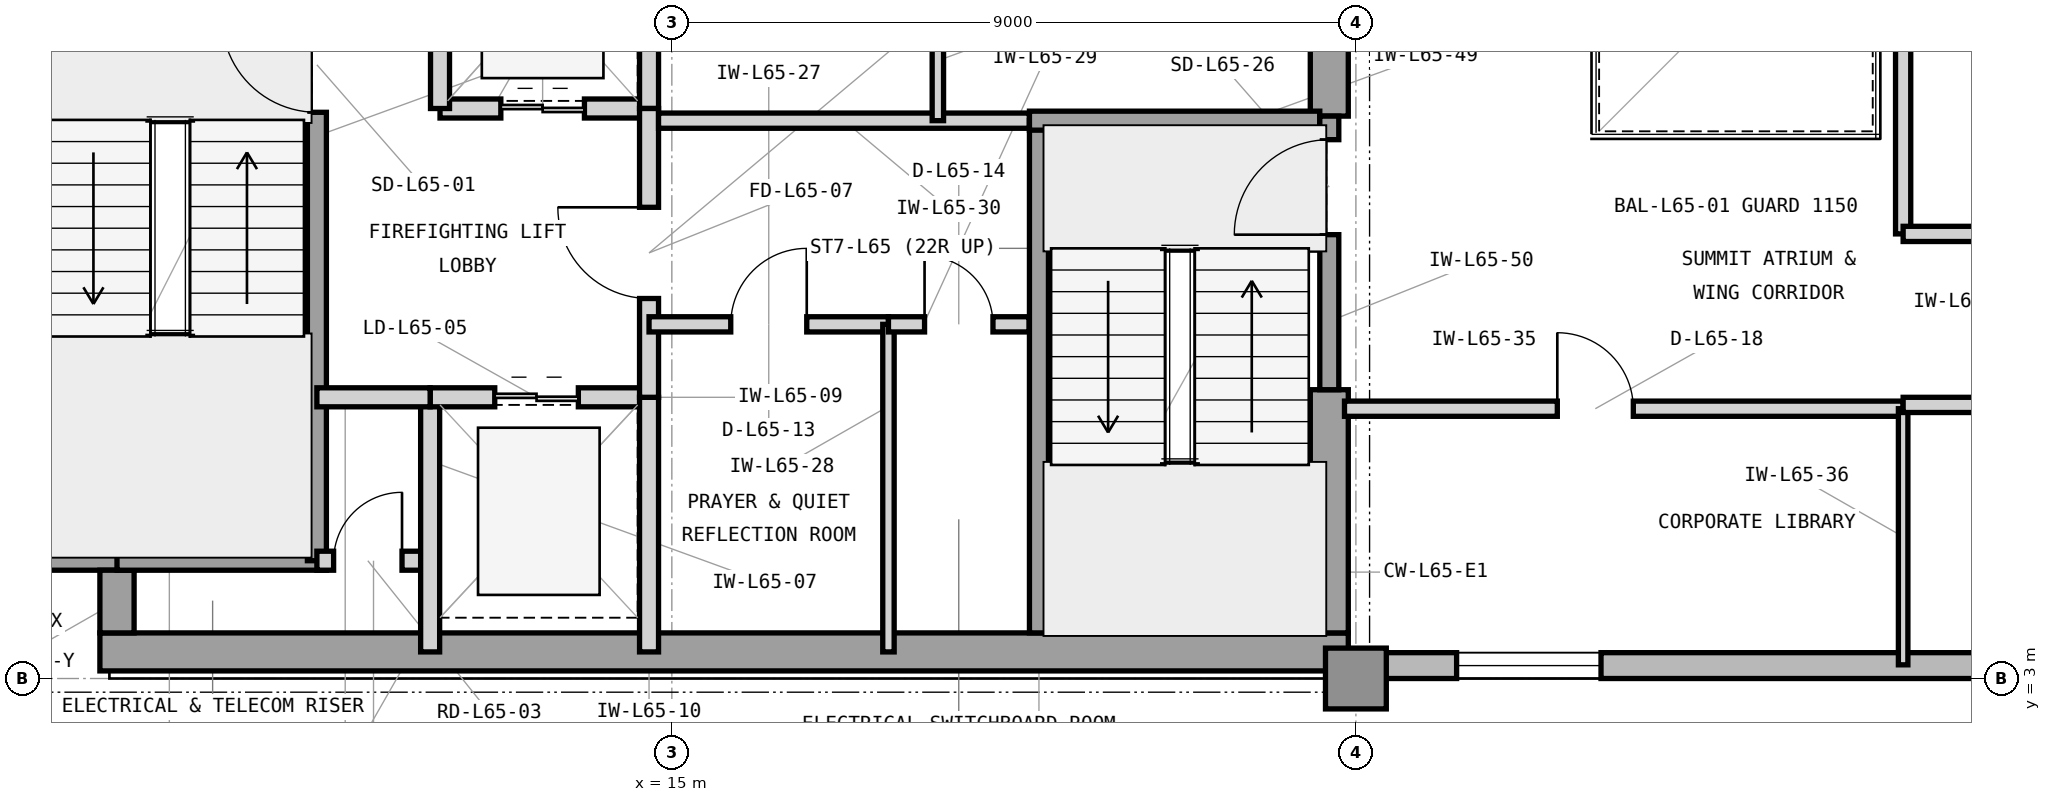
"""IFC4 building model, lengths in metres.
Left out: names, types, materials, properties, quantities, classifications, styles, units other than length and angle.
Written with IfcOpenShell. Run it as: python <this file> out.ifc"""

import sys

from ifc_helpers import new_model, si_unit, direction, frame, frame_2d, origin, origin_2d, place, context, subcontext, project, spatial, rectangle, extrude, element, fill, save


model = new_model("IFC4")
c1 = context("Model", 3, precision=1e-05, world=origin(), true_north=direction((0.0, 1.0)))
c2 = subcontext(c1, "Body", "Model", "MODEL_VIEW")
j1 = project(units=[si_unit("LENGTHUNIT", "METRE"), si_unit("PLANEANGLEUNIT", "RADIAN")], contexts=[c1])
p1 = place(None, origin())
s1 = spatial("IfcSite", under=j1, at=p1, CompositionType="ELEMENT")
p2 = place(p1, origin())
s2 = spatial("IfcBuilding", under=s1, at=p2, CompositionType="ELEMENT")
p3 = place(p2, frame((0.0, 0.0, 266.4)))
s3 = spatial("IfcBuildingStorey", under=s2, at=p3, CompositionType="ELEMENT", Elevation=266.4)
p4 = place(p3, frame((7.475, 3.35, 0.0), z_axis=(0.0, 0.0, 1.0), x_axis=(1.0, 0.0, 0.0)))
e1 = element("IfcWall", 1, at=p4, inside=s3, PredefinedType="SHEAR", context=c2, shape_type="SweptSolid", body=[
    extrude(rectangle(XDim=16.425, YDim=0.5, at=frame_2d((8.212, 0.0))), origin(), (0.0, 0.0, 1.0), 3.9),
])
p5 = place(p3, frame((23.65, 3.6, 0.0), z_axis=(0.0, 0.0, 1.0), x_axis=(0.0, 1.0, 0.0)))
e2 = element("IfcWall", 2, at=p5, inside=s3, PredefinedType="SHEAR", context=c2, shape_type="SweptSolid", body=[
    extrude(rectangle(XDim=3.2, YDim=0.5, at=frame_2d((1.6, 0.0))), origin(), (0.0, 0.0, 1.0), 3.9),
])
p6 = place(p3, frame((23.65, 10.4, 0.0), z_axis=(0.0, 0.0, 1.0), x_axis=(0.0, 1.0, 0.0)))
e3 = element("IfcWall", 3, at=p6, inside=s3, PredefinedType="SHEAR", context=c2, shape_type="SweptSolid", body=[
    extrude(rectangle(XDim=3.2, YDim=0.5, at=frame_2d((1.6, 0.0))), origin(), (0.0, 0.0, 1.0), 3.9),
])
p7 = place(p3, frame((6.6, 4.65, 0.0), z_axis=(0.0, 0.0, 1.0), x_axis=(1.0, 0.0, 0.0)))
e4 = element("IfcWall", 4, at=p7, inside=s3, PredefinedType="SHEAR", context=c2, shape_type="SweptSolid", body=[
    extrude(rectangle(XDim=1.325, YDim=0.45, at=frame_2d((0.663, 0.0))), origin(), (0.0, 0.0, 1.0), 3.9),
])
p8 = place(p3, frame((7.7, 3.6, 0.0), z_axis=(0.0, 0.0, 1.0), x_axis=(0.0, 1.0, 0.0)))
e5 = element("IfcWall", 5, at=p8, inside=s3, PredefinedType="SHEAR", context=c2, shape_type="SweptSolid", body=[
    extrude(rectangle(XDim=0.825, YDim=0.45, at=frame_2d((0.413, 0.0))), origin(), (0.0, 0.0, 1.0), 3.9),
])
p9 = place(p3, frame((24.0, 3.0, 0.0), z_axis=(0.0, 0.0, 1.0), x_axis=(1.0, 0.0, 0.0)))
e6 = element("IfcColumn", 6, at=p9, inside=s3, PredefinedType="COLUMN", context=c2, shape_type="SweptSolid", body=[
    extrude(rectangle(XDim=0.8, YDim=0.8, at=origin_2d()), origin(), (0.0, 0.0, 1.0), 3.9),
])
p10 = place(p3, frame((23.9, 3.17, 0.0), z_axis=(0.0, 0.0, 1.0), x_axis=(1.0, 0.0, 0.0)))
e7 = element("IfcWall", 7, at=p10, inside=s3, PredefinedType="STANDARD", context=c2, shape_type="SweptSolid", body=[
    extrude(rectangle(XDim=28.5, YDim=0.34, at=frame_2d((14.25, 0.0))), origin(), (0.0, 0.0, 1.0), 3.715),
])
p11 = place(p10, frame((1.425, 0.0, 0.8)))
e8 = element("IfcOpeningElement", 8, at=p11, cuts=e7, PredefinedType="OPENING", context=c2, shape_type="SweptSolid", body=[
    extrude(rectangle(XDim=1.9, YDim=2.35, at=frame_2d((0.95, 1.175))), frame((0.0, 0.18, 0.0), z_axis=(0.0, -1.0, 0.0), x_axis=(1.0, 0.0, 0.0)), (0.0, 0.0, 1.0), 0.36),
])
p12 = place(p10, frame((10.575, 0.0, 0.8)))
e9 = element("IfcOpeningElement", 9, at=p12, cuts=e7, PredefinedType="OPENING", context=c2, shape_type="SweptSolid", body=[
    extrude(rectangle(XDim=2.6, YDim=2.35, at=frame_2d((1.3, 1.175))), frame((0.0, 0.18, 0.0), z_axis=(0.0, -1.0, 0.0), x_axis=(1.0, 0.0, 0.0)), (0.0, 0.0, 1.0), 0.36),
])
p13 = place(p10, frame((20.075, 0.0, 0.8)))
e10 = element("IfcOpeningElement", 10, at=p13, cuts=e7, PredefinedType="OPENING", context=c2, shape_type="SweptSolid", body=[
    extrude(rectangle(XDim=2.6, YDim=2.35, at=frame_2d((1.3, 1.175))), frame((0.0, 0.18, 0.0), z_axis=(0.0, -1.0, 0.0), x_axis=(1.0, 0.0, 0.0)), (0.0, 0.0, 1.0), 0.36),
])
p14 = place(p3, frame((7.7, 4.55, 0.0), z_axis=(0.0, 0.0, 1.0), x_axis=(1.0, 0.0, 0.0)))
e11 = element("IfcWall", 11, at=p14, inside=s3, PredefinedType="SHEAR", context=c2, shape_type="SweptSolid", body=[
    extrude(rectangle(XDim=2.755, YDim=0.25, at=frame_2d((1.377, 0.0))), origin(), (0.0, 0.0, 1.0), 3.9),
])
p15 = place(p3, frame((10.33, 4.55, 0.0), z_axis=(0.0, 0.0, 1.0), x_axis=(0.0, 1.0, 0.0)))
e12 = element("IfcWall", 12, at=p15, inside=s3, PredefinedType="SHEAR", context=c2, shape_type="SweptSolid", body=[
    extrude(rectangle(XDim=7.45, YDim=0.25, at=frame_2d((3.725, 0.0))), origin(), (0.0, 0.0, 1.0), 3.9),
])
p16 = place(p15, frame((5.9, 0.0, 0.0)))
e13 = element("IfcOpeningElement", 13, at=p16, cuts=e12, PredefinedType="OPENING", context=c2, shape_type="SweptSolid", body=[
    extrude(rectangle(XDim=1.25, YDim=2.2, at=frame_2d((0.625, 1.1))), frame((0.0, 0.135, 0.0), z_axis=(0.0, -1.0, 0.0), x_axis=(1.0, 0.0, 0.0)), (0.0, 0.0, 1.0), 0.27),
])
p17 = place(p3, frame((10.33, 4.55, 0.0), z_axis=(0.0, 0.0, 1.0), x_axis=(1.0, 0.0, 0.0)))
e14 = element("IfcWall", 14, at=p17, inside=s3, PredefinedType="PARTITIONING", context=c2, shape_type="SweptSolid", body=[
    extrude(rectangle(XDim=1.49, YDim=0.25, at=frame_2d((0.745, 0.0))), origin(), (0.0, 0.0, 1.0), 3.705),
])
p18 = place(p17, frame((0.22, 0.0, 0.0)))
e15 = element("IfcOpeningElement", 15, at=p18, cuts=e14, PredefinedType="OPENING", context=c2, shape_type="SweptSolid", body=[
    extrude(rectangle(XDim=0.9, YDim=2.1, at=frame_2d((0.45, 1.05))), frame((0.0, 0.135, 0.0), z_axis=(0.0, -1.0, 0.0), x_axis=(1.0, 0.0, 0.0)), (0.0, 0.0, 1.0), 0.27),
])
p19 = place(p3, frame((11.82, 3.35, 0.0), z_axis=(0.0, 0.0, 1.0), x_axis=(0.0, 1.0, 0.0)))
e16 = element("IfcWall", 16, at=p19, inside=s3, PredefinedType="PARTITIONING", context=c2, shape_type="SweptSolid", body=[
    extrude(rectangle(XDim=3.35, YDim=0.25, at=frame_2d((1.675, 0.0))), origin(), (0.0, 0.0, 1.0), 3.705),
])
p20 = place(p3, frame((11.82, 6.7, 0.0), z_axis=(0.0, 0.0, 1.0), x_axis=(1.0, 0.0, 0.0)))
e17 = element("IfcWall", 17, at=p20, inside=s3, PredefinedType="PARTITIONING", context=c2, shape_type="SweptSolid", body=[
    extrude(rectangle(XDim=2.88, YDim=0.25, at=frame_2d((1.44, 0.0))), origin(), (0.0, 0.0, 1.0), 3.088),
])
p21 = place(p20, frame((0.85, 0.0, 0.0)))
e18 = element("IfcOpeningElement", 18, at=p21, cuts=e17, PredefinedType="OPENING", context=c2, shape_type="SweptSolid", body=[
    extrude(rectangle(XDim=1.1, YDim=2.25, at=frame_2d((0.55, 1.125))), frame((0.0, 0.135, 0.0), z_axis=(0.0, -1.0, 0.0), x_axis=(1.0, 0.0, 0.0)), (0.0, 0.0, 1.0), 0.27),
])
p22 = place(p3, frame((14.7, 3.35, 0.0), z_axis=(0.0, 0.0, 1.0), x_axis=(0.0, 1.0, 0.0)))
e19 = element("IfcWall", 19, at=p22, inside=s3, PredefinedType="PARTITIONING", context=c2, shape_type="SweptSolid", body=[
    extrude(rectangle(XDim=3.35, YDim=0.25, at=frame_2d((1.675, 0.0))), origin(), (0.0, 0.0, 1.0), 3.705),
])
p23 = place(p3, frame((11.95, 10.5, 0.0), z_axis=(0.0, 0.0, 1.0), x_axis=(1.0, 0.0, 0.0)))
e20 = element("IfcWall", 20, at=p23, inside=s3, PredefinedType="PARTITIONING", context=c2, shape_type="SweptSolid", body=[
    extrude(rectangle(XDim=2.75, YDim=0.25, at=frame_2d((1.375, 0.0))), origin(), (0.0, 0.0, 1.0), 3.088),
])
p24 = place(p23, frame((0.8, 0.0, 0.0)))
e21 = element("IfcOpeningElement", 21, at=p24, cuts=e20, PredefinedType="OPENING", context=c2, shape_type="SweptSolid", body=[
    extrude(rectangle(XDim=1.1, YDim=2.25, at=frame_2d((0.55, 1.125))), frame((0.0, 0.135, 0.0), z_axis=(0.0, -1.0, 0.0), x_axis=(1.0, 0.0, 0.0)), (0.0, 0.0, 1.0), 0.27),
])
for number, where, z_axis, x_axis in (
    (22, (11.95, 10.5, 0.0), (0.0, 0.0, 1.0), (0.0, 1.0, 0.0)),
    (23, (14.7, 10.5, 0.0), (0.0, 0.0, 1.0), (0.0, 1.0, 0.0)),
):
    element("IfcWall", number, at=place(p3, frame(where, z_axis=z_axis, x_axis=x_axis)), inside=s3, PredefinedType="PARTITIONING", context=c2, shape_type="SweptSolid", body=[
        extrude(rectangle(XDim=3.0, YDim=0.25, at=frame_2d((1.5, 0.0))), origin(), (0.0, 0.0, 1.0), 3.705),
    ])
p25 = place(p3, frame((14.7, 6.7, 0.0), z_axis=(0.0, 0.0, 1.0), x_axis=(0.0, 1.0, 0.0)))
e24 = element("IfcWall", 24, at=p25, inside=s3, PredefinedType="PARTITIONING", context=c2, shape_type="SweptSolid", body=[
    extrude(rectangle(XDim=3.8, YDim=0.25, at=frame_2d((1.9, 0.0))), origin(), (0.0, 0.0, 1.0), 3.705),
])
p26 = place(p25, frame((1.3, 0.0, 0.0)))
e25 = element("IfcOpeningElement", 25, at=p26, cuts=e24, PredefinedType="OPENING", context=c2, shape_type="SweptSolid", body=[
    extrude(rectangle(XDim=1.2, YDim=2.2, at=frame_2d((0.6, 1.1))), frame((0.0, 0.135, 0.0), z_axis=(0.0, -1.0, 0.0), x_axis=(1.0, 0.0, 0.0)), (0.0, 0.0, 1.0), 0.27),
])
p27 = place(p3, frame((10.33, 6.7, 0.0), z_axis=(0.0, 0.0, 1.0), x_axis=(1.0, 0.0, 0.0)))
e26 = element("IfcWall", 26, at=p27, inside=s3, PredefinedType="PARTITIONING", context=c2, shape_type="SweptSolid", body=[
    extrude(rectangle(XDim=1.49, YDim=0.25, at=frame_2d((0.745, 0.0))), origin(), (0.0, 0.0, 1.0), 3.088),
])
p28 = place(p3, frame((14.7, 7.66, 0.0), z_axis=(0.0, 0.0, 1.0), x_axis=(1.0, 0.0, 0.0)))
e27 = element("IfcWall", 27, at=p28, inside=s3, PredefinedType="PARTITIONING", context=c2, shape_type="SweptSolid", body=[
    extrude(rectangle(XDim=3.15, YDim=0.2, at=frame_2d((1.575, 0.0))), origin(), (0.0, 0.0, 1.0), 3.705),
])
p29 = place(p28, frame((1.075, 0.0, 0.0)))
e28 = element("IfcOpeningElement", 28, at=p29, cuts=e27, PredefinedType="OPENING", context=c2, shape_type="SweptSolid", body=[
    extrude(rectangle(XDim=1.0, YDim=2.15, at=frame_2d((0.5, 1.075))), frame((0.0, 0.11, 0.0), z_axis=(0.0, -1.0, 0.0), x_axis=(1.0, 0.0, 0.0)), (0.0, 0.0, 1.0), 0.22),
])
p30 = place(p3, frame((17.85, 3.35, 0.0), z_axis=(0.0, 0.0, 1.0), x_axis=(0.0, 1.0, 0.0)))
e29 = element("IfcWall", 29, at=p30, inside=s3, PredefinedType="PARTITIONING", context=c2, shape_type="SweptSolid", body=[
    extrude(rectangle(XDim=4.31, YDim=0.15, at=frame_2d((2.155, 0.0))), origin(), (0.0, 0.0, 1.0), 3.705),
])
p31 = place(p3, frame((17.85, 7.66, 0.0), z_axis=(0.0, 0.0, 1.0), x_axis=(1.0, 0.0, 0.0)))
e30 = element("IfcWall", 30, at=p31, inside=s3, PredefinedType="PARTITIONING", context=c2, shape_type="SweptSolid", body=[
    extrude(rectangle(XDim=1.85, YDim=0.2, at=frame_2d((0.925, 0.0))), origin(), (0.0, 0.0, 1.0), 3.705),
])
p32 = place(p31, frame((0.475, 0.0, 0.0)))
e31 = element("IfcOpeningElement", 31, at=p32, cuts=e30, PredefinedType="OPENING", context=c2, shape_type="SweptSolid", body=[
    extrude(rectangle(XDim=0.9, YDim=2.1, at=frame_2d((0.45, 1.05))), frame((0.0, 0.11, 0.0), z_axis=(0.0, -1.0, 0.0), x_axis=(1.0, 0.0, 0.0)), (0.0, 0.0, 1.0), 0.22),
])
p33 = place(p3, frame((14.825, 10.34, 0.0), z_axis=(0.0, 0.0, 1.0), x_axis=(1.0, 0.0, 0.0)))
e32 = element("IfcWall", 32, at=p33, inside=s3, PredefinedType="PARTITIONING", context=c2, shape_type="SweptSolid", body=[
    extrude(rectangle(XDim=4.88, YDim=0.2, at=frame_2d((2.44, 0.0))), origin(), (0.0, 0.0, 1.0), 3.088),
])
p34 = place(p3, frame((18.5, 10.34, 0.0), z_axis=(0.0, 0.0, 1.0), x_axis=(0.0, 1.0, 0.0)))
e33 = element("IfcWall", 33, at=p34, inside=s3, PredefinedType="PARTITIONING", context=c2, shape_type="SweptSolid", body=[
    extrude(rectangle(XDim=3.16, YDim=0.15, at=frame_2d((1.58, 0.0))), origin(), (0.0, 0.0, 1.0), 3.705),
])
p35 = place(p3, frame((23.85, 6.55, 0.0), z_axis=(0.0, 0.0, 1.0), x_axis=(1.0, 0.0, 0.0)))
e34 = element("IfcWall", 34, at=p35, inside=s3, PredefinedType="PARTITIONING", context=c2, shape_type="SweptSolid", body=[
    extrude(rectangle(XDim=7.35, YDim=0.2, at=frame_2d((3.675, 0.0))), origin(), (0.0, 0.0, 1.0), 3.705),
])
p36 = place(p35, frame((2.8, 0.0, 0.0)))
e35 = element("IfcOpeningElement", 35, at=p36, cuts=e34, PredefinedType="OPENING", context=c2, shape_type="SweptSolid", body=[
    extrude(rectangle(XDim=1.0, YDim=2.15, at=frame_2d((0.5, 1.075))), frame((0.0, 0.11, 0.0), z_axis=(0.0, -1.0, 0.0), x_axis=(1.0, 0.0, 0.0)), (0.0, 0.0, 1.0), 0.22),
])
p37 = place(p3, frame((31.2, 3.18, 0.0), z_axis=(0.0, 0.0, 1.0), x_axis=(0.0, 1.0, 0.0)))
e36 = element("IfcWall", 36, at=p37, inside=s3, PredefinedType="PARTITIONING", context=c2, shape_type="SweptSolid", body=[
    extrude(rectangle(XDim=3.37, YDim=0.125, at=frame_2d((1.685, 0.0))), origin(), (0.0, 0.0, 1.0), 3.705),
])
p38 = place(p3, frame((31.2, 8.85, 0.0), z_axis=(0.0, 0.0, 1.0), x_axis=(0.0, 1.0, 0.0)))
e37 = element("IfcWall", 37, at=p38, inside=s3, PredefinedType="PARTITIONING", context=c2, shape_type="SweptSolid", body=[
    extrude(rectangle(XDim=11.97, YDim=0.2, at=frame_2d((5.985, 0.0))), origin(), (0.0, 0.0, 1.0), 3.705),
])
p39 = place(p3, frame((31.2, 6.6, 0.0), z_axis=(0.0, 0.0, 1.0), x_axis=(1.0, 0.0, 0.0)))
e38 = element("IfcWall", 38, at=p39, inside=s3, PredefinedType="PARTITIONING", context=c2, shape_type="SweptSolid", body=[
    extrude(rectangle(XDim=9.5, YDim=0.2, at=frame_2d((4.75, 0.0))), origin(), (0.0, 0.0, 1.0), 3.705),
])
p40 = place(p39, frame((4.25, 0.0, 0.0)))
e39 = element("IfcOpeningElement", 39, at=p40, cuts=e38, PredefinedType="OPENING", context=c2, shape_type="SweptSolid", body=[
    extrude(rectangle(XDim=1.0, YDim=2.15, at=frame_2d((0.5, 1.075))), frame((0.0, 0.11, 0.0), z_axis=(0.0, -1.0, 0.0), x_axis=(1.0, 0.0, 0.0)), (0.0, 0.0, 1.0), 0.22),
])
p41 = place(p3, frame((31.2, 8.85, 0.0), z_axis=(0.0, 0.0, 1.0), x_axis=(1.0, 0.0, 0.0)))
e40 = element("IfcWall", 40, at=p41, inside=s3, PredefinedType="PARTITIONING", context=c2, shape_type="SweptSolid", body=[
    extrude(rectangle(XDim=6.5, YDim=0.2, at=frame_2d((3.25, 0.0))), origin(), (0.0, 0.0, 1.0), 3.705),
])
p42 = place(p41, frame((2.5, 0.0, 0.0)))
e41 = element("IfcOpeningElement", 41, at=p42, cuts=e40, PredefinedType="OPENING", context=c2, shape_type="SweptSolid", body=[
    extrude(rectangle(XDim=1.5, YDim=2.3, at=frame_2d((0.75, 1.15))), frame((0.0, 0.11, 0.0), z_axis=(0.0, -1.0, 0.0), x_axis=(1.0, 0.0, 0.0)), (0.0, 0.0, 1.0), 0.22),
])
p43 = place(p3, frame((19.83, 3.6, 0.0), z_axis=(0.0, 0.0, 1.0), x_axis=(0.0, 1.0, 0.0)))
e42 = element("IfcWall", 42, at=p43, inside=s3, PredefinedType="SHEAR", context=c2, shape_type="SweptSolid", body=[
    extrude(rectangle(XDim=6.74, YDim=0.25, at=frame_2d((3.37, 0.0))), origin(), (0.0, 0.0, 1.0), 3.9),
])
p44 = place(p3, frame((19.705, 10.34, 0.0), z_axis=(0.0, 0.0, 1.0), x_axis=(1.0, 0.0, 0.0)))
e43 = element("IfcWall", 43, at=p44, inside=s3, PredefinedType="SHEAR", context=c2, shape_type="SweptSolid", body=[
    extrude(rectangle(XDim=3.82, YDim=0.25, at=frame_2d((1.91, 0.0))), origin(), (0.0, 0.0, 1.0), 3.9),
])
p45 = place(p3, frame((23.65, 6.8, 0.0), z_axis=(0.0, 0.0, 1.0), x_axis=(0.0, 1.0, 0.0)))
e44 = element("IfcWall", 44, at=p45, inside=s3, PredefinedType="SHEAR", context=c2, shape_type="SweptSolid", body=[
    extrude(rectangle(XDim=3.6, YDim=0.25, at=frame_2d((1.8, 0.0))), origin(), (0.0, 0.0, 1.0), 3.9),
])
p46 = place(p45, frame((2.04, 0.0, 0.0)))
e45 = element("IfcOpeningElement", 45, at=p46, cuts=e44, PredefinedType="OPENING", context=c2, shape_type="SweptSolid", body=[
    extrude(rectangle(XDim=1.25, YDim=2.2, at=frame_2d((0.625, 1.1))), frame((0.0, 0.135, 0.0), z_axis=(0.0, -1.0, 0.0), x_axis=(1.0, 0.0, 0.0)), (0.0, 0.0, 1.0), 0.27),
])
p47 = place(p11, origin())
e46 = element("IfcWindow", 46, at=p47, inside=s3, PartitioningType="SINGLE_PANEL", PredefinedType="WINDOW", context=c2, shape_type="SweptSolid", body=[
    extrude(rectangle(XDim=1.9, YDim=2.35, at=frame_2d((0.95, 1.175))), frame((0.0, 0.11, 0.0), z_axis=(0.0, -1.0, 0.0), x_axis=(1.0, 0.0, 0.0)), (0.0, 0.0, 1.0), 0.06),
])
fill(e8, e46)
p48 = place(p16, origin())
e47 = element("IfcDoor", 47, at=p48, inside=s3, OperationType="SINGLE_SWING_RIGHT", PredefinedType="DOOR", context=c2, shape_type="SweptSolid", body=[
    extrude(rectangle(XDim=1.25, YDim=2.2, at=frame_2d((0.625, 1.1))), frame((0.0, 0.025, 0.0), z_axis=(0.0, -1.0, 0.0), x_axis=(1.0, 0.0, 0.0)), (0.0, 0.0, 1.0), 0.05),
])
fill(e13, e47)
p49 = place(p18, origin())
e48 = element("IfcDoor", 48, at=p49, inside=s3, OperationType="SINGLE_SWING_RIGHT", PredefinedType="TRAPDOOR", context=c2, shape_type="SweptSolid", body=[
    extrude(rectangle(XDim=0.9, YDim=2.1, at=frame_2d((0.45, 1.05))), frame((0.0, 0.025, 0.0), z_axis=(0.0, -1.0, 0.0), x_axis=(1.0, 0.0, 0.0)), (0.0, 0.0, 1.0), 0.05),
])
fill(e15, e48)
p50 = place(p21, origin())
e49 = element("IfcDoor", 49, at=p50, inside=s3, OperationType="DOUBLE_DOOR_SLIDING", PredefinedType="DOOR", context=c2, shape_type="SweptSolid", body=[
    extrude(rectangle(XDim=1.1, YDim=2.25, at=frame_2d((0.55, 1.125))), frame((0.0, 0.025, 0.0), z_axis=(0.0, -1.0, 0.0), x_axis=(1.0, 0.0, 0.0)), (0.0, 0.0, 1.0), 0.05),
])
fill(e18, e49)
p51 = place(p24, origin())
e50 = element("IfcDoor", 50, at=p51, inside=s3, OperationType="DOUBLE_DOOR_SLIDING", PredefinedType="DOOR", context=c2, shape_type="SweptSolid", body=[
    extrude(rectangle(XDim=1.1, YDim=2.25, at=frame_2d((0.55, 1.125))), frame((0.0, 0.025, 0.0), z_axis=(0.0, -1.0, 0.0), x_axis=(1.0, 0.0, 0.0)), (0.0, 0.0, 1.0), 0.05),
])
fill(e21, e50)
p52 = place(p26, origin())
e51 = element("IfcDoor", 51, at=p52, inside=s3, OperationType="SINGLE_SWING_RIGHT", PredefinedType="DOOR", context=c2, shape_type="SweptSolid", body=[
    extrude(rectangle(XDim=1.2, YDim=2.2, at=frame_2d((0.6, 1.1))), frame((0.0, 0.025, 0.0), z_axis=(0.0, -1.0, 0.0), x_axis=(1.0, 0.0, 0.0)), (0.0, 0.0, 1.0), 0.05),
])
fill(e25, e51)
p53 = place(p29, origin())
e52 = element("IfcDoor", 52, at=p53, inside=s3, OperationType="SINGLE_SWING_RIGHT", PredefinedType="DOOR", context=c2, shape_type="SweptSolid", body=[
    extrude(rectangle(XDim=1.0, YDim=2.15, at=frame_2d((0.5, 1.075))), frame((0.0, 0.025, 0.0), z_axis=(0.0, -1.0, 0.0), x_axis=(1.0, 0.0, 0.0)), (0.0, 0.0, 1.0), 0.05),
])
fill(e28, e52)
p54 = place(p32, origin())
e53 = element("IfcDoor", 53, at=p54, inside=s3, OperationType="SINGLE_SWING_LEFT", PredefinedType="TRAPDOOR", context=c2, shape_type="SweptSolid", body=[
    extrude(rectangle(XDim=0.9, YDim=2.1, at=frame_2d((0.45, 1.05))), frame((0.0, 0.025, 0.0), z_axis=(0.0, -1.0, 0.0), x_axis=(1.0, 0.0, 0.0)), (0.0, 0.0, 1.0), 0.05),
])
fill(e31, e53)
p55 = place(p36, origin())
e54 = element("IfcDoor", 54, at=p55, inside=s3, OperationType="SINGLE_SWING_LEFT", PredefinedType="DOOR", context=c2, shape_type="SweptSolid", body=[
    extrude(rectangle(XDim=1.0, YDim=2.15, at=frame_2d((0.5, 1.075))), frame((0.0, 0.025, 0.0), z_axis=(0.0, -1.0, 0.0), x_axis=(1.0, 0.0, 0.0)), (0.0, 0.0, 1.0), 0.05),
])
fill(e35, e54)
p56 = place(p46, origin())
e55 = element("IfcDoor", 55, at=p56, inside=s3, OperationType="SINGLE_SWING_LEFT", PredefinedType="DOOR", context=c2, shape_type="SweptSolid", body=[
    extrude(rectangle(XDim=1.25, YDim=2.2, at=frame_2d((0.625, 1.1))), frame((0.0, 0.025, 0.0), z_axis=(0.0, -1.0, 0.0), x_axis=(1.0, 0.0, 0.0)), (0.0, 0.0, 1.0), 0.05),
])
fill(e45, e55)
save(model, sys.argv[1])
